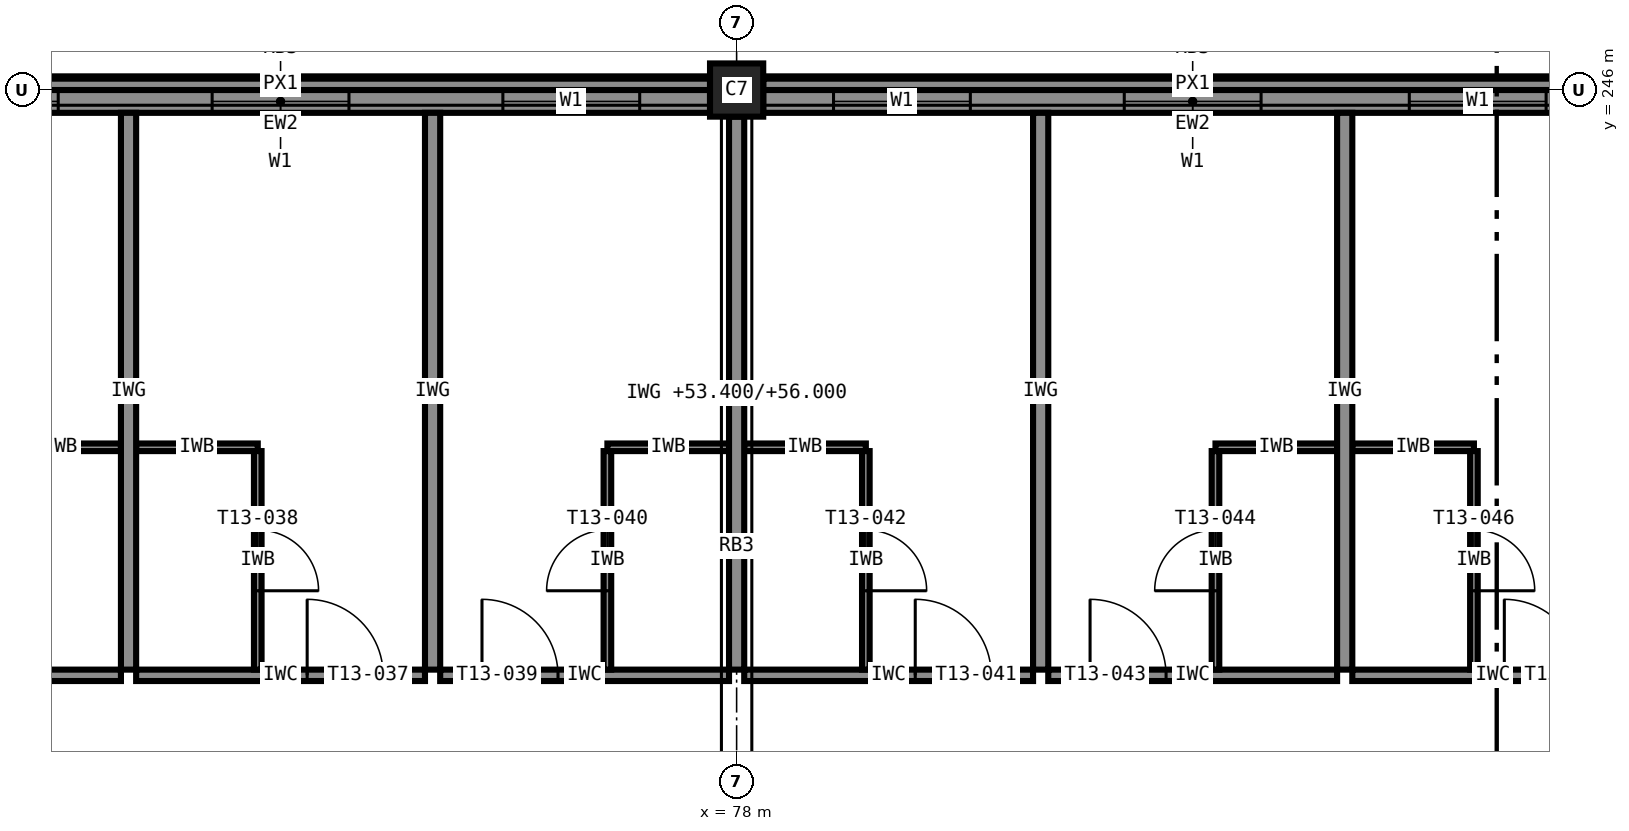
"""IFC4 building model, lengths in metres.
Left out: names, types, materials, properties, quantities, classifications, styles, units other than length and angle.
Written with IfcOpenShell. Run it as: python <this file> out.ifc"""

import sys

from ifc_helpers import new_model, si_unit, direction, frame, frame_2d, origin, origin_2d, place, context, subcontext, project, spatial, rectangle, extrude, element, fill, save


model = new_model("IFC4")
c1 = context("Model", 3, precision=1e-05, world=origin(), true_north=direction((0.0, 1.0)))
c2 = subcontext(c1, "Body", "Model", "MODEL_VIEW")
j1 = project(units=[si_unit("LENGTHUNIT", "METRE"), si_unit("PLANEANGLEUNIT", "RADIAN")], contexts=[c1])
p1 = place(None, origin())
s1 = spatial("IfcSite", under=j1, at=p1, CompositionType="ELEMENT")
p2 = place(p1, origin())
s2 = spatial("IfcBuilding", under=s1, at=p2, CompositionType="ELEMENT")
p3 = place(p2, frame((0.0, 0.0, 53.4)))
s3 = spatial("IfcBuildingStorey", under=s2, at=p3, CompositionType="ELEMENT", Elevation=53.4)
p4 = place(p3, frame((78.0, 246.0, 0.0), z_axis=(0.0, 0.0, 1.0), x_axis=(1.0, 0.0, 0.0)))
e1 = element("IfcColumn", 1, at=p4, inside=s3, PredefinedType="COLUMN", context=c2, shape_type="SweptSolid", body=[
    extrude(rectangle(XDim=0.7, YDim=0.7, at=origin_2d()), origin(), (0.0, 0.0, 1.0), 3.6),
])
p5 = place(p3, frame((89.65, 245.85, 0.0), z_axis=(0.0, 0.0, 1.0), x_axis=(-1.0, 0.0, 0.0)))
e2 = element("IfcWall", 2, at=p5, inside=s3, PredefinedType="STANDARD", context=c2, shape_type="SweptSolid", body=[
    extrude(rectangle(XDim=11.3, YDim=0.3, at=frame_2d((5.65, 0.0))), origin(), (0.0, 0.0, 1.0), 2.6),
])
p6 = place(p5, frame((8.575, 0.0, 0.85)))
e3 = element("IfcOpeningElement", 3, at=p6, cuts=e2, PredefinedType="OPENING", context=c2, shape_type="SweptSolid", body=[
    extrude(rectangle(XDim=1.8, YDim=1.75, at=frame_2d((0.9, 0.875))), frame((0.0, 0.16, 0.0), z_axis=(0.0, -1.0, 0.0), x_axis=(1.0, 0.0, 0.0)), (0.0, 0.0, 1.0), 0.32),
])
p7 = place(p5, frame((4.75, 0.0, 0.85)))
e4 = element("IfcOpeningElement", 4, at=p7, cuts=e2, PredefinedType="OPENING", context=c2, shape_type="SweptSolid", body=[
    extrude(rectangle(XDim=1.8, YDim=1.75, at=frame_2d((0.9, 0.875))), frame((0.0, 0.16, 0.0), z_axis=(0.0, -1.0, 0.0), x_axis=(1.0, 0.0, 0.0)), (0.0, 0.0, 1.0), 0.32),
])
p8 = place(p5, frame((1.0, 0.0, 0.85)))
e5 = element("IfcOpeningElement", 5, at=p8, cuts=e2, PredefinedType="OPENING", context=c2, shape_type="SweptSolid", body=[
    extrude(rectangle(XDim=1.8, YDim=1.75, at=frame_2d((0.9, 0.875))), frame((0.0, 0.16, 0.0), z_axis=(0.0, -1.0, 0.0), x_axis=(1.0, 0.0, 0.0)), (0.0, 0.0, 1.0), 0.32),
])
p9 = place(p3, frame((77.65, 245.85, 0.0), z_axis=(0.0, 0.0, 1.0), x_axis=(-1.0, 0.0, 0.0)))
e6 = element("IfcWall", 6, at=p9, inside=s3, PredefinedType="STANDARD", context=c2, shape_type="SweptSolid", body=[
    extrude(rectangle(XDim=11.3, YDim=0.3, at=frame_2d((5.65, 0.0))), origin(), (0.0, 0.0, 1.0), 2.6),
])
p10 = place(p9, frame((8.575, 0.0, 0.85)))
e7 = element("IfcOpeningElement", 7, at=p10, cuts=e6, PredefinedType="OPENING", context=c2, shape_type="SweptSolid", body=[
    extrude(rectangle(XDim=1.8, YDim=1.75, at=frame_2d((0.9, 0.875))), frame((0.0, 0.16, 0.0), z_axis=(0.0, -1.0, 0.0), x_axis=(1.0, 0.0, 0.0)), (0.0, 0.0, 1.0), 0.32),
])
p11 = place(p9, frame((4.75, 0.0, 0.85)))
e8 = element("IfcOpeningElement", 8, at=p11, cuts=e6, PredefinedType="OPENING", context=c2, shape_type="SweptSolid", body=[
    extrude(rectangle(XDim=1.8, YDim=1.75, at=frame_2d((0.9, 0.875))), frame((0.0, 0.16, 0.0), z_axis=(0.0, -1.0, 0.0), x_axis=(1.0, 0.0, 0.0)), (0.0, 0.0, 1.0), 0.32),
])
p12 = place(p9, frame((0.925, 0.0, 0.85)))
e9 = element("IfcOpeningElement", 9, at=p12, cuts=e6, PredefinedType="OPENING", context=c2, shape_type="SweptSolid", body=[
    extrude(rectangle(XDim=1.8, YDim=1.75, at=frame_2d((0.9, 0.875))), frame((0.0, 0.16, 0.0), z_axis=(0.0, -1.0, 0.0), x_axis=(1.0, 0.0, 0.0)), (0.0, 0.0, 1.0), 0.32),
])
for number, where, z_axis, x_axis in (
    (10, (89.65, 246.075, 3.4), (0.0, 0.0, 1.0), (-1.0, 0.0, 0.0)),
    (11, (77.65, 246.075, 3.4), (0.0, 0.0, 1.0), (-1.0, 0.0, 0.0)),
):
    element("IfcWall", number, at=place(p3, frame(where, z_axis=z_axis, x_axis=x_axis)), inside=s3, PredefinedType="STANDARD", context=c2, shape_type="SweptSolid", body=[
        extrude(rectangle(XDim=11.3, YDim=0.15, at=frame_2d((5.65, 0.0))), origin(), (0.0, 0.0, 1.0), 0.2),
    ])
p13 = place(p3, frame((66.1, 238.3, 0.0), z_axis=(0.0, 0.0, 1.0), x_axis=(1.0, 0.0, 0.0)))
e12 = element("IfcWall", 12, at=p13, inside=s3, PredefinedType="PARTITIONING", context=c2, shape_type="SweptSolid", body=[
    extrude(rectangle(XDim=3.8, YDim=0.15, at=frame_2d((1.9, 0.0))), origin(), (0.0, 0.0, 1.0), 3.4),
])
p14 = place(p13, frame((0.55, 0.0, 0.0)))
e13 = element("IfcOpeningElement", 13, at=p14, cuts=e12, PredefinedType="OPENING", context=c2, shape_type="SweptSolid", body=[
    extrude(rectangle(XDim=1.0, YDim=2.1, at=frame_2d((0.5, 1.05))), frame((0.0, 0.085, 0.0), z_axis=(0.0, -1.0, 0.0), x_axis=(1.0, 0.0, 0.0)), (0.0, 0.0, 1.0), 0.17),
])
p15 = place(p3, frame((68.3, 241.3, 0.0), z_axis=(0.0, 0.0, 1.0), x_axis=(1.0, 0.0, 0.0)))
e14 = element("IfcWall", 14, at=p15, inside=s3, PredefinedType="PARTITIONING", context=c2, shape_type="SweptSolid", body=[
    extrude(rectangle(XDim=1.6, YDim=0.1, at=frame_2d((0.8, 0.0))), origin(), (0.0, 0.0, 1.0), 3.4),
])
p16 = place(p3, frame((70.1, 238.3, 0.0), z_axis=(0.0, 0.0, 1.0), x_axis=(1.0, 0.0, 0.0)))
e15 = element("IfcWall", 15, at=p16, inside=s3, PredefinedType="PARTITIONING", context=c2, shape_type="SweptSolid", body=[
    extrude(rectangle(XDim=3.8, YDim=0.15, at=frame_2d((1.9, 0.0))), origin(), (0.0, 0.0, 1.0), 3.4),
])
p17 = place(p16, frame((2.25, 0.0, 0.0)))
e16 = element("IfcOpeningElement", 16, at=p17, cuts=e15, PredefinedType="OPENING", context=c2, shape_type="SweptSolid", body=[
    extrude(rectangle(XDim=1.0, YDim=2.1, at=frame_2d((0.5, 1.05))), frame((0.0, 0.085, 0.0), z_axis=(0.0, -1.0, 0.0), x_axis=(1.0, 0.0, 0.0)), (0.0, 0.0, 1.0), 0.17),
])
p18 = place(p3, frame((70.1, 241.3, 0.0), z_axis=(0.0, 0.0, 1.0), x_axis=(1.0, 0.0, 0.0)))
e17 = element("IfcWall", 17, at=p18, inside=s3, PredefinedType="PARTITIONING", context=c2, shape_type="SweptSolid", body=[
    extrude(rectangle(XDim=1.6, YDim=0.1, at=frame_2d((0.8, 0.0))), origin(), (0.0, 0.0, 1.0), 3.4),
])
p19 = place(p3, frame((71.7, 241.25, 0.0), z_axis=(0.0, 0.0, 1.0), x_axis=(0.0, -1.0, 0.0)))
e18 = element("IfcWall", 18, at=p19, inside=s3, PredefinedType="PARTITIONING", context=c2, shape_type="SweptSolid", body=[
    extrude(rectangle(XDim=2.875, YDim=0.1, at=frame_2d((1.438, 0.0))), origin(), (0.0, 0.0, 1.0), 3.4),
])
p20 = place(p19, frame((1.038, 0.0, 0.0)))
e19 = element("IfcOpeningElement", 19, at=p20, cuts=e18, PredefinedType="OPENING", context=c2, shape_type="SweptSolid", body=[
    extrude(rectangle(XDim=0.8, YDim=2.1, at=frame_2d((0.4, 1.05))), frame((0.0, 0.06, 0.0), z_axis=(0.0, -1.0, 0.0), x_axis=(1.0, 0.0, 0.0)), (0.0, 0.0, 1.0), 0.12),
])
p21 = place(p3, frame((74.1, 238.3, 0.0), z_axis=(0.0, 0.0, 1.0), x_axis=(1.0, 0.0, 0.0)))
e20 = element("IfcWall", 20, at=p21, inside=s3, PredefinedType="PARTITIONING", context=c2, shape_type="SweptSolid", body=[
    extrude(rectangle(XDim=3.8, YDim=0.15, at=frame_2d((1.9, 0.0))), origin(), (0.0, 0.0, 1.0), 3.4),
])
p22 = place(p21, frame((0.55, 0.0, 0.0)))
e21 = element("IfcOpeningElement", 21, at=p22, cuts=e20, PredefinedType="OPENING", context=c2, shape_type="SweptSolid", body=[
    extrude(rectangle(XDim=1.0, YDim=2.1, at=frame_2d((0.5, 1.05))), frame((0.0, 0.085, 0.0), z_axis=(0.0, -1.0, 0.0), x_axis=(1.0, 0.0, 0.0)), (0.0, 0.0, 1.0), 0.17),
])
p23 = place(p3, frame((76.3, 241.3, 0.0), z_axis=(0.0, 0.0, 1.0), x_axis=(1.0, 0.0, 0.0)))
e22 = element("IfcWall", 22, at=p23, inside=s3, PredefinedType="PARTITIONING", context=c2, shape_type="SweptSolid", body=[
    extrude(rectangle(XDim=1.6, YDim=0.1, at=frame_2d((0.8, 0.0))), origin(), (0.0, 0.0, 1.0), 3.4),
])
p24 = place(p3, frame((76.3, 238.375, 0.0), z_axis=(0.0, 0.0, 1.0), x_axis=(0.0, 1.0, 0.0)))
e23 = element("IfcWall", 23, at=p24, inside=s3, PredefinedType="PARTITIONING", context=c2, shape_type="SweptSolid", body=[
    extrude(rectangle(XDim=2.875, YDim=0.1, at=frame_2d((1.438, 0.0))), origin(), (0.0, 0.0, 1.0), 3.4),
])
p25 = place(p24, frame((1.038, 0.0, 0.0)))
e24 = element("IfcOpeningElement", 24, at=p25, cuts=e23, PredefinedType="OPENING", context=c2, shape_type="SweptSolid", body=[
    extrude(rectangle(XDim=0.8, YDim=2.1, at=frame_2d((0.4, 1.05))), frame((0.0, 0.06, 0.0), z_axis=(0.0, -1.0, 0.0), x_axis=(1.0, 0.0, 0.0)), (0.0, 0.0, 1.0), 0.12),
])
p26 = place(p3, frame((78.1, 238.3, 0.0), z_axis=(0.0, 0.0, 1.0), x_axis=(1.0, 0.0, 0.0)))
e25 = element("IfcWall", 25, at=p26, inside=s3, PredefinedType="PARTITIONING", context=c2, shape_type="SweptSolid", body=[
    extrude(rectangle(XDim=3.8, YDim=0.15, at=frame_2d((1.9, 0.0))), origin(), (0.0, 0.0, 1.0), 3.4),
])
p27 = place(p26, frame((2.25, 0.0, 0.0)))
e26 = element("IfcOpeningElement", 26, at=p27, cuts=e25, PredefinedType="OPENING", context=c2, shape_type="SweptSolid", body=[
    extrude(rectangle(XDim=1.0, YDim=2.1, at=frame_2d((0.5, 1.05))), frame((0.0, 0.085, 0.0), z_axis=(0.0, -1.0, 0.0), x_axis=(1.0, 0.0, 0.0)), (0.0, 0.0, 1.0), 0.17),
])
p28 = place(p3, frame((78.1, 241.3, 0.0), z_axis=(0.0, 0.0, 1.0), x_axis=(1.0, 0.0, 0.0)))
e27 = element("IfcWall", 27, at=p28, inside=s3, PredefinedType="PARTITIONING", context=c2, shape_type="SweptSolid", body=[
    extrude(rectangle(XDim=1.6, YDim=0.1, at=frame_2d((0.8, 0.0))), origin(), (0.0, 0.0, 1.0), 3.4),
])
p29 = place(p3, frame((79.7, 241.25, 0.0), z_axis=(0.0, 0.0, 1.0), x_axis=(0.0, -1.0, 0.0)))
e28 = element("IfcWall", 28, at=p29, inside=s3, PredefinedType="PARTITIONING", context=c2, shape_type="SweptSolid", body=[
    extrude(rectangle(XDim=2.875, YDim=0.1, at=frame_2d((1.438, 0.0))), origin(), (0.0, 0.0, 1.0), 3.4),
])
p30 = place(p29, frame((1.038, 0.0, 0.0)))
e29 = element("IfcOpeningElement", 29, at=p30, cuts=e28, PredefinedType="OPENING", context=c2, shape_type="SweptSolid", body=[
    extrude(rectangle(XDim=0.8, YDim=2.1, at=frame_2d((0.4, 1.05))), frame((0.0, 0.06, 0.0), z_axis=(0.0, -1.0, 0.0), x_axis=(1.0, 0.0, 0.0)), (0.0, 0.0, 1.0), 0.12),
])
p31 = place(p3, frame((82.1, 238.3, 0.0), z_axis=(0.0, 0.0, 1.0), x_axis=(1.0, 0.0, 0.0)))
e30 = element("IfcWall", 30, at=p31, inside=s3, PredefinedType="PARTITIONING", context=c2, shape_type="SweptSolid", body=[
    extrude(rectangle(XDim=3.8, YDim=0.15, at=frame_2d((1.9, 0.0))), origin(), (0.0, 0.0, 1.0), 3.4),
])
p32 = place(p31, frame((0.55, 0.0, 0.0)))
e31 = element("IfcOpeningElement", 31, at=p32, cuts=e30, PredefinedType="OPENING", context=c2, shape_type="SweptSolid", body=[
    extrude(rectangle(XDim=1.0, YDim=2.1, at=frame_2d((0.5, 1.05))), frame((0.0, 0.085, 0.0), z_axis=(0.0, -1.0, 0.0), x_axis=(1.0, 0.0, 0.0)), (0.0, 0.0, 1.0), 0.17),
])
p33 = place(p3, frame((84.3, 241.3, 0.0), z_axis=(0.0, 0.0, 1.0), x_axis=(1.0, 0.0, 0.0)))
e32 = element("IfcWall", 32, at=p33, inside=s3, PredefinedType="PARTITIONING", context=c2, shape_type="SweptSolid", body=[
    extrude(rectangle(XDim=1.6, YDim=0.1, at=frame_2d((0.8, 0.0))), origin(), (0.0, 0.0, 1.0), 3.4),
])
p34 = place(p3, frame((84.3, 238.375, 0.0), z_axis=(0.0, 0.0, 1.0), x_axis=(0.0, 1.0, 0.0)))
e33 = element("IfcWall", 33, at=p34, inside=s3, PredefinedType="PARTITIONING", context=c2, shape_type="SweptSolid", body=[
    extrude(rectangle(XDim=2.875, YDim=0.1, at=frame_2d((1.438, 0.0))), origin(), (0.0, 0.0, 1.0), 3.4),
])
p35 = place(p34, frame((1.038, 0.0, 0.0)))
e34 = element("IfcOpeningElement", 34, at=p35, cuts=e33, PredefinedType="OPENING", context=c2, shape_type="SweptSolid", body=[
    extrude(rectangle(XDim=0.8, YDim=2.1, at=frame_2d((0.4, 1.05))), frame((0.0, 0.06, 0.0), z_axis=(0.0, -1.0, 0.0), x_axis=(1.0, 0.0, 0.0)), (0.0, 0.0, 1.0), 0.12),
])
p36 = place(p3, frame((86.1, 238.3, 0.0), z_axis=(0.0, 0.0, 1.0), x_axis=(1.0, 0.0, 0.0)))
e35 = element("IfcWall", 35, at=p36, inside=s3, PredefinedType="PARTITIONING", context=c2, shape_type="SweptSolid", body=[
    extrude(rectangle(XDim=3.7, YDim=0.15, at=frame_2d((1.85, 0.0))), origin(), (0.0, 0.0, 1.0), 3.4),
])
p37 = place(p36, frame((2.0, 0.0, 0.0)))
e36 = element("IfcOpeningElement", 36, at=p37, cuts=e35, PredefinedType="OPENING", context=c2, shape_type="SweptSolid", body=[
    extrude(rectangle(XDim=1.0, YDim=2.1, at=frame_2d((0.5, 1.05))), frame((0.0, 0.085, 0.0), z_axis=(0.0, -1.0, 0.0), x_axis=(1.0, 0.0, 0.0)), (0.0, 0.0, 1.0), 0.17),
])
p38 = place(p3, frame((86.1, 241.3, 0.0), z_axis=(0.0, 0.0, 1.0), x_axis=(1.0, 0.0, 0.0)))
e37 = element("IfcWall", 37, at=p38, inside=s3, PredefinedType="PARTITIONING", context=c2, shape_type="SweptSolid", body=[
    extrude(rectangle(XDim=1.6, YDim=0.1, at=frame_2d((0.8, 0.0))), origin(), (0.0, 0.0, 1.0), 3.4),
])
p39 = place(p3, frame((87.7, 241.25, 0.0), z_axis=(0.0, 0.0, 1.0), x_axis=(0.0, -1.0, 0.0)))
e38 = element("IfcWall", 38, at=p39, inside=s3, PredefinedType="PARTITIONING", context=c2, shape_type="SweptSolid", body=[
    extrude(rectangle(XDim=2.875, YDim=0.1, at=frame_2d((1.438, 0.0))), origin(), (0.0, 0.0, 1.0), 3.4),
])
p40 = place(p39, frame((1.038, 0.0, 0.0)))
e39 = element("IfcOpeningElement", 39, at=p40, cuts=e38, PredefinedType="OPENING", context=c2, shape_type="SweptSolid", body=[
    extrude(rectangle(XDim=0.8, YDim=2.1, at=frame_2d((0.4, 1.05))), frame((0.0, 0.06, 0.0), z_axis=(0.0, -1.0, 0.0), x_axis=(1.0, 0.0, 0.0)), (0.0, 0.0, 1.0), 0.12),
])
for number, where, z_axis, x_axis in (
    (40, (70.0, 245.7, 0.0), (0.0, 0.0, 1.0), (0.0, -1.0, 0.0)),
    (41, (74.0, 245.7, 0.0), (0.0, 0.0, 1.0), (0.0, -1.0, 0.0)),
):
    element("IfcWall", number, at=place(p3, frame(where, z_axis=z_axis, x_axis=x_axis)), inside=s3, PredefinedType="PARTITIONING", context=c2, shape_type="SweptSolid", body=[
        extrude(rectangle(XDim=7.325, YDim=0.2, at=frame_2d((3.663, 0.0))), origin(), (0.0, 0.0, 1.0), 3.4),
    ])
p41 = place(p3, frame((78.0, 245.65, 0.0), z_axis=(0.0, 0.0, 1.0), x_axis=(0.0, -1.0, 0.0)))
e42 = element("IfcWall", 42, at=p41, inside=s3, PredefinedType="PARTITIONING", context=c2, shape_type="SweptSolid", body=[
    extrude(rectangle(XDim=7.275, YDim=0.2, at=frame_2d((3.637, 0.0))), origin(), (0.0, 0.0, 1.0), 2.6),
])
for number, where, z_axis, x_axis in (
    (43, (82.0, 245.7, 0.0), (0.0, 0.0, 1.0), (0.0, -1.0, 0.0)),
    (44, (86.0, 245.7, 0.0), (0.0, 0.0, 1.0), (0.0, -1.0, 0.0)),
):
    element("IfcWall", number, at=place(p3, frame(where, z_axis=z_axis, x_axis=x_axis)), inside=s3, PredefinedType="PARTITIONING", context=c2, shape_type="SweptSolid", body=[
        extrude(rectangle(XDim=7.325, YDim=0.2, at=frame_2d((3.663, 0.0))), origin(), (0.0, 0.0, 1.0), 3.4),
    ])
p42 = place(p6, origin())
e45 = element("IfcWindow", 45, at=p42, inside=s3, PartitioningType="SINGLE_PANEL", PredefinedType="WINDOW", context=c2, shape_type="SweptSolid", body=[
    extrude(rectangle(XDim=1.8, YDim=1.75, at=frame_2d((0.9, 0.875))), frame((0.0, 0.03, 0.0), z_axis=(0.0, -1.0, 0.0), x_axis=(1.0, 0.0, 0.0)), (0.0, 0.0, 1.0), 0.06),
])
fill(e3, e45)
p43 = place(p7, origin())
e46 = element("IfcWindow", 46, at=p43, inside=s3, PartitioningType="SINGLE_PANEL", PredefinedType="WINDOW", context=c2, shape_type="SweptSolid", body=[
    extrude(rectangle(XDim=1.8, YDim=1.75, at=frame_2d((0.9, 0.875))), frame((0.0, 0.03, 0.0), z_axis=(0.0, -1.0, 0.0), x_axis=(1.0, 0.0, 0.0)), (0.0, 0.0, 1.0), 0.06),
])
fill(e4, e46)
p44 = place(p8, origin())
e47 = element("IfcWindow", 47, at=p44, inside=s3, PartitioningType="SINGLE_PANEL", PredefinedType="WINDOW", context=c2, shape_type="SweptSolid", body=[
    extrude(rectangle(XDim=1.8, YDim=1.75, at=frame_2d((0.9, 0.875))), frame((0.0, 0.03, 0.0), z_axis=(0.0, -1.0, 0.0), x_axis=(1.0, 0.0, 0.0)), (0.0, 0.0, 1.0), 0.06),
])
fill(e5, e47)
p45 = place(p10, origin())
e48 = element("IfcWindow", 48, at=p45, inside=s3, PartitioningType="SINGLE_PANEL", PredefinedType="WINDOW", context=c2, shape_type="SweptSolid", body=[
    extrude(rectangle(XDim=1.8, YDim=1.75, at=frame_2d((0.9, 0.875))), frame((0.0, 0.03, 0.0), z_axis=(0.0, -1.0, 0.0), x_axis=(1.0, 0.0, 0.0)), (0.0, 0.0, 1.0), 0.06),
])
fill(e7, e48)
p46 = place(p11, origin())
e49 = element("IfcWindow", 49, at=p46, inside=s3, PartitioningType="SINGLE_PANEL", PredefinedType="WINDOW", context=c2, shape_type="SweptSolid", body=[
    extrude(rectangle(XDim=1.8, YDim=1.75, at=frame_2d((0.9, 0.875))), frame((0.0, 0.03, 0.0), z_axis=(0.0, -1.0, 0.0), x_axis=(1.0, 0.0, 0.0)), (0.0, 0.0, 1.0), 0.06),
])
fill(e8, e49)
p47 = place(p12, origin())
e50 = element("IfcWindow", 50, at=p47, inside=s3, PartitioningType="SINGLE_PANEL", PredefinedType="WINDOW", context=c2, shape_type="SweptSolid", body=[
    extrude(rectangle(XDim=1.8, YDim=1.75, at=frame_2d((0.9, 0.875))), frame((0.0, 0.03, 0.0), z_axis=(0.0, -1.0, 0.0), x_axis=(1.0, 0.0, 0.0)), (0.0, 0.0, 1.0), 0.06),
])
fill(e9, e50)
p48 = place(p17, origin())
e51 = element("IfcDoor", 51, at=p48, inside=s3, OperationType="SINGLE_SWING_LEFT", PredefinedType="DOOR", context=c2, shape_type="SweptSolid", body=[
    extrude(rectangle(XDim=1.0, YDim=2.1, at=frame_2d((0.5, 1.05))), frame((0.0, 0.025, 0.0), z_axis=(0.0, -1.0, 0.0), x_axis=(1.0, 0.0, 0.0)), (0.0, 0.0, 1.0), 0.05),
])
fill(e16, e51)
p49 = place(p20, origin())
e52 = element("IfcDoor", 52, at=p49, inside=s3, OperationType="SINGLE_SWING_RIGHT", PredefinedType="DOOR", context=c2, shape_type="SweptSolid", body=[
    extrude(rectangle(XDim=0.8, YDim=2.1, at=frame_2d((0.4, 1.05))), frame((0.0, 0.025, 0.0), z_axis=(0.0, -1.0, 0.0), x_axis=(1.0, 0.0, 0.0)), (0.0, 0.0, 1.0), 0.05),
])
fill(e19, e52)
p50 = place(p22, origin())
e53 = element("IfcDoor", 53, at=p50, inside=s3, OperationType="SINGLE_SWING_LEFT", PredefinedType="DOOR", context=c2, shape_type="SweptSolid", body=[
    extrude(rectangle(XDim=1.0, YDim=2.1, at=frame_2d((0.5, 1.05))), frame((0.0, 0.025, 0.0), z_axis=(0.0, -1.0, 0.0), x_axis=(1.0, 0.0, 0.0)), (0.0, 0.0, 1.0), 0.05),
])
fill(e21, e53)
p51 = place(p25, origin())
e54 = element("IfcDoor", 54, at=p51, inside=s3, OperationType="SINGLE_SWING_LEFT", PredefinedType="DOOR", context=c2, shape_type="SweptSolid", body=[
    extrude(rectangle(XDim=0.8, YDim=2.1, at=frame_2d((0.4, 1.05))), frame((0.0, 0.025, 0.0), z_axis=(0.0, -1.0, 0.0), x_axis=(1.0, 0.0, 0.0)), (0.0, 0.0, 1.0), 0.05),
])
fill(e24, e54)
p52 = place(p27, origin())
e55 = element("IfcDoor", 55, at=p52, inside=s3, OperationType="SINGLE_SWING_LEFT", PredefinedType="DOOR", context=c2, shape_type="SweptSolid", body=[
    extrude(rectangle(XDim=1.0, YDim=2.1, at=frame_2d((0.5, 1.05))), frame((0.0, 0.025, 0.0), z_axis=(0.0, -1.0, 0.0), x_axis=(1.0, 0.0, 0.0)), (0.0, 0.0, 1.0), 0.05),
])
fill(e26, e55)
p53 = place(p30, origin())
e56 = element("IfcDoor", 56, at=p53, inside=s3, OperationType="SINGLE_SWING_RIGHT", PredefinedType="DOOR", context=c2, shape_type="SweptSolid", body=[
    extrude(rectangle(XDim=0.8, YDim=2.1, at=frame_2d((0.4, 1.05))), frame((0.0, 0.025, 0.0), z_axis=(0.0, -1.0, 0.0), x_axis=(1.0, 0.0, 0.0)), (0.0, 0.0, 1.0), 0.05),
])
fill(e29, e56)
p54 = place(p32, origin())
e57 = element("IfcDoor", 57, at=p54, inside=s3, OperationType="SINGLE_SWING_LEFT", PredefinedType="DOOR", context=c2, shape_type="SweptSolid", body=[
    extrude(rectangle(XDim=1.0, YDim=2.1, at=frame_2d((0.5, 1.05))), frame((0.0, 0.025, 0.0), z_axis=(0.0, -1.0, 0.0), x_axis=(1.0, 0.0, 0.0)), (0.0, 0.0, 1.0), 0.05),
])
fill(e31, e57)
p55 = place(p35, origin())
e58 = element("IfcDoor", 58, at=p55, inside=s3, OperationType="SINGLE_SWING_LEFT", PredefinedType="DOOR", context=c2, shape_type="SweptSolid", body=[
    extrude(rectangle(XDim=0.8, YDim=2.1, at=frame_2d((0.4, 1.05))), frame((0.0, 0.025, 0.0), z_axis=(0.0, -1.0, 0.0), x_axis=(1.0, 0.0, 0.0)), (0.0, 0.0, 1.0), 0.05),
])
fill(e34, e58)
p56 = place(p37, origin())
e59 = element("IfcDoor", 59, at=p56, inside=s3, OperationType="SINGLE_SWING_LEFT", PredefinedType="DOOR", context=c2, shape_type="SweptSolid", body=[
    extrude(rectangle(XDim=1.0, YDim=2.1, at=frame_2d((0.5, 1.05))), frame((0.0, 0.025, 0.0), z_axis=(0.0, -1.0, 0.0), x_axis=(1.0, 0.0, 0.0)), (0.0, 0.0, 1.0), 0.05),
])
fill(e36, e59)
p57 = place(p40, origin())
e60 = element("IfcDoor", 60, at=p57, inside=s3, OperationType="SINGLE_SWING_RIGHT", PredefinedType="DOOR", context=c2, shape_type="SweptSolid", body=[
    extrude(rectangle(XDim=0.8, YDim=2.1, at=frame_2d((0.4, 1.05))), frame((0.0, 0.025, 0.0), z_axis=(0.0, -1.0, 0.0), x_axis=(1.0, 0.0, 0.0)), (0.0, 0.0, 1.0), 0.05),
])
fill(e39, e60)
save(model, sys.argv[1])
